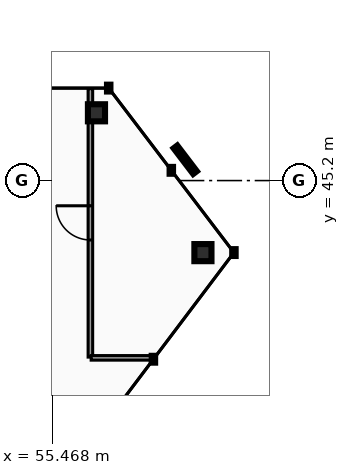
"""IFC4 building model, lengths in metres.
Left out: names, types, materials, properties, quantities, classifications, styles, units other than length and angle.
Written with IfcOpenShell. Run it as: python <this file> out.ifc"""

import sys

from ifc_helpers import new_model, si_unit, direction, frame, frame_2d, origin, origin_2d, place, context, subcontext, project, spatial, rectangle, hollow_rectangle, extrude, element, fill, save


model = new_model("IFC4")
c1 = context("Model", 3, precision=1e-05, world=origin(), true_north=direction((0.0, 1.0)))
c2 = subcontext(c1, "Body", "Model", "MODEL_VIEW")
j1 = project(units=[si_unit("LENGTHUNIT", "METRE"), si_unit("PLANEANGLEUNIT", "RADIAN")], contexts=[c1])
p1 = place(None, origin())
s1 = spatial("IfcSite", under=j1, at=p1, CompositionType="ELEMENT")
p2 = place(p1, origin())
s2 = spatial("IfcBuilding", under=s1, at=p2, CompositionType="ELEMENT")
p3 = place(p2, frame((0.0, 0.0, 282.2)))
s3 = spatial("IfcBuildingStorey", under=s2, at=p3, CompositionType="ELEMENT", Elevation=282.2)
for number, where, z_axis, x_axis in (
    (1, (56.633, 46.983, 0.0), (0.0, 0.0, 1.0), (1.0, 0.0, 0.0)),
    (2, (59.435, 43.304, 0.0), (0.0, 0.0, 1.0), (1.0, 0.0, 0.0)),
):
    element("IfcColumn", number, at=place(p3, frame(where, z_axis=z_axis, x_axis=x_axis)), inside=s3, PredefinedType="COLUMN", context=c2, shape_type="SweptSolid", body=[
        extrude(hollow_rectangle(XDim=0.45, YDim=0.45, WallThickness=0.022, at=origin_2d()), origin(), (0.0, 0.0, 1.0), 3.18),
    ])
p4 = place(p3, frame((56.473, 40.555, 0.0), z_axis=(0.0, 0.0, 1.0), x_axis=(0.0, 1.0, 0.0)))
e3 = element("IfcWall", 3, at=p4, inside=s3, PredefinedType="PARTITIONING", context=c2, shape_type="SweptSolid", body=[
    extrude(rectangle(XDim=7.063, YDim=0.12, at=frame_2d((3.532, 0.0))), origin(), (0.0, 0.0, 1.0), 2.235),
])
p5 = place(p4, frame((3.082, 0.0, 0.0)))
e4 = element("IfcOpeningElement", 4, at=p5, cuts=e3, PredefinedType="OPENING", context=c2, shape_type="SweptSolid", body=[
    extrude(rectangle(XDim=0.9, YDim=2.05, at=frame_2d((0.45, 1.025))), frame((0.0, 0.07, 0.0), z_axis=(0.0, -1.0, 0.0), x_axis=(1.0, 0.0, 0.0)), (0.0, 0.0, 1.0), 0.14),
])
p6 = place(p3, frame((56.493, 40.535, 0.0), z_axis=(0.0, 0.0, 1.0), x_axis=(1.0, 0.0, 0.0)))
e5 = element("IfcWall", 5, at=p6, inside=s3, PredefinedType="PARTITIONING", context=c2, shape_type="SweptSolid", body=[
    extrude(rectangle(XDim=1.651, YDim=0.12, at=frame_2d((0.825, 0.0))), origin(), (0.0, 0.0, 1.0), 2.235),
])
p7 = place(p5, origin())
e6 = element("IfcDoor", 6, at=p7, inside=s3, OperationType="SINGLE_SWING_RIGHT", PredefinedType="DOOR", context=c2, shape_type="SweptSolid", body=[
    extrude(rectangle(XDim=0.9, YDim=2.05, at=frame_2d((0.45, 1.025))), frame((0.0, 0.025, 0.0), z_axis=(0.0, -1.0, 0.0), x_axis=(1.0, 0.0, 0.0)), (0.0, 0.0, 1.0), 0.05),
])
fill(e4, e6)
save(model, sys.argv[1])
